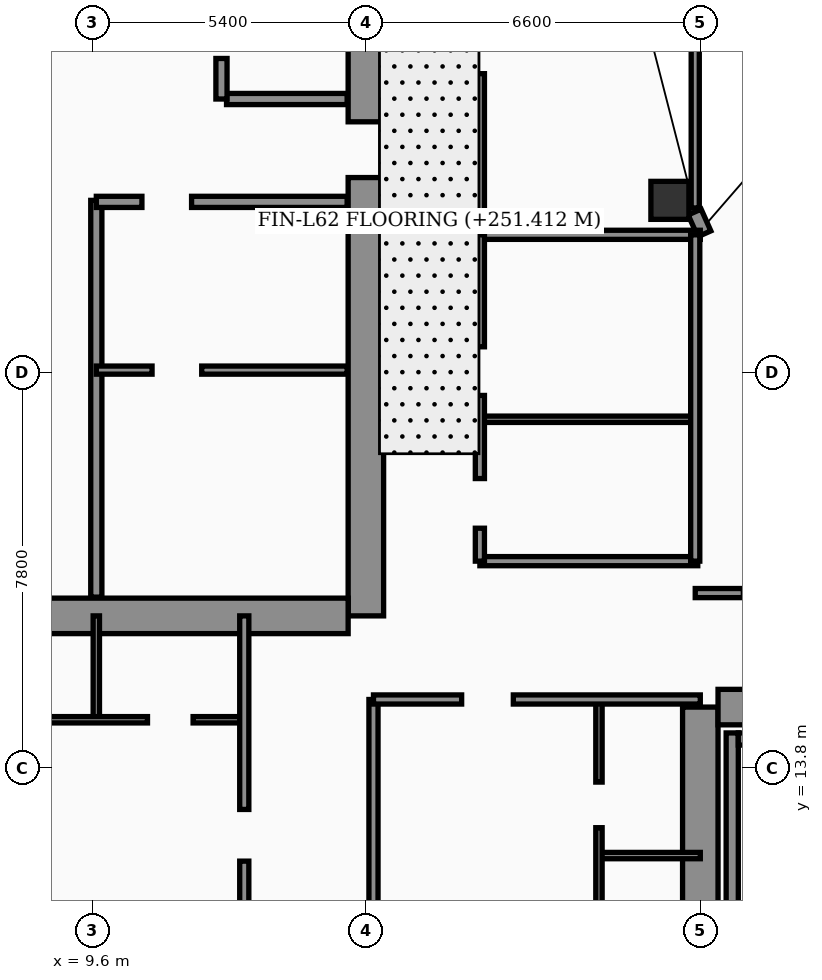
"""IFC4 building model, lengths in metres.
Left out: names, types, materials, properties, quantities, classifications, styles, units other than length and angle.
Written with IfcOpenShell. Run it as: python <this file> out.ifc"""

import sys

from ifc_helpers import new_model, si_unit, direction, frame, frame_2d, origin, origin_2d, place, context, subcontext, project, spatial, rectangle, hollow_rectangle, extrude, element, fill, save


model = new_model("IFC4")
c1 = context("Model", 3, precision=1e-05, world=origin(), true_north=direction((0.0, 1.0)))
c2 = subcontext(c1, "Body", "Model", "MODEL_VIEW")
j1 = project(units=[si_unit("LENGTHUNIT", "METRE"), si_unit("PLANEANGLEUNIT", "RADIAN")], contexts=[c1])
p1 = place(None, origin())
s1 = spatial("IfcSite", under=j1, at=p1, CompositionType="ELEMENT")
p2 = place(p1, origin())
s2 = spatial("IfcBuilding", under=s1, at=p2, CompositionType="ELEMENT")
p3 = place(p2, frame((0.0, 0.0, 251.4)))
s3 = spatial("IfcBuildingStorey", under=s2, at=p3, CompositionType="ELEMENT", Elevation=251.4)
p4 = place(p3, frame((15.0, 16.8, 0.0), z_axis=(0.0, 0.0, 1.0), x_axis=(0.0, 1.0, 0.0)))
e1 = element("IfcWall", 1, at=p4, inside=s3, PredefinedType="SHEAR", context=c2, shape_type="SweptSolid", body=[
    extrude(rectangle(XDim=21.6, YDim=0.7, at=frame_2d((10.8, 0.0))), origin(), (0.0, 0.0, 1.0), 3.56),
])
p5 = place(p4, frame((8.65, 0.0, 0.0)))
e2 = element("IfcOpeningElement", 2, at=p5, cuts=e1, PredefinedType="OPENING", context=c2, shape_type="SweptSolid", body=[
    extrude(rectangle(XDim=1.1, YDim=2.2, at=frame_2d((0.55, 1.1))), frame((0.0, 0.36, 0.0), z_axis=(0.0, -1.0, 0.0), x_axis=(1.0, 0.0, 0.0)), (0.0, 0.0, 1.0), 0.72),
])
p6 = place(p4, frame((18.9, 0.0, 0.0)))
e3 = element("IfcOpeningElement", 3, at=p6, cuts=e1, PredefinedType="OPENING", context=c2, shape_type="SweptSolid", body=[
    extrude(rectangle(XDim=1.1, YDim=2.2, at=frame_2d((0.55, 1.1))), frame((0.0, 0.36, 0.0), z_axis=(0.0, -1.0, 0.0), x_axis=(1.0, 0.0, 0.0)), (0.0, 0.0, 1.0), 0.72),
])
p7 = place(p3, frame((4.55, 16.8, 0.0), z_axis=(0.0, 0.0, 1.0), x_axis=(1.0, 0.0, 0.0)))
e4 = element("IfcWall", 4, at=p7, inside=s3, PredefinedType="SHEAR", context=c2, shape_type="SweptSolid", body=[
    extrude(rectangle(XDim=10.1, YDim=0.7, at=frame_2d((5.05, 0.0))), origin(), (0.0, 0.0, 1.0), 3.56),
])
p8 = place(p3, frame((21.6, 4.6, 0.0), z_axis=(0.0, 0.0, 1.0), x_axis=(0.0, 1.0, 0.0)))
e5 = element("IfcWall", 5, at=p8, inside=s3, PredefinedType="SHEAR", context=c2, shape_type="SweptSolid", body=[
    extrude(rectangle(XDim=10.4, YDim=0.7, at=frame_2d((5.2, 0.0))), origin(), (0.0, 0.0, 1.0), 3.56),
])
p9 = place(p3, frame((21.95, 15.0, 0.0), z_axis=(0.0, 0.0, 1.0), x_axis=(1.0, 0.0, 0.0)))
e6 = element("IfcWall", 6, at=p9, inside=s3, PredefinedType="SHEAR", context=c2, shape_type="SweptSolid", body=[
    extrude(rectangle(XDim=10.1, YDim=0.7, at=frame_2d((5.05, 0.0))), origin(), (0.0, 0.0, 1.0), 3.56),
])
p10 = place(p9, frame((4.95, 0.0, 0.0)))
e7 = element("IfcOpeningElement", 7, at=p10, cuts=e6, PredefinedType="OPENING", context=c2, shape_type="SweptSolid", body=[
    extrude(rectangle(XDim=1.1, YDim=2.2, at=frame_2d((0.55, 1.1))), frame((0.0, 0.36, 0.0), z_axis=(0.0, -1.0, 0.0), x_axis=(1.0, 0.0, 0.0)), (0.0, 0.0, 1.0), 0.72),
])
p11 = place(p3, frame((22.23, 4.95, 0.0), z_axis=(0.0, 0.0, 1.0), x_axis=(0.0, 1.0, 0.0)))
e8 = element("IfcWall", 8, at=p11, inside=s3, PredefinedType="SOLIDWALL", context=c2, shape_type="SweptSolid", body=[
    extrude(rectangle(XDim=9.54, YDim=0.24, at=frame_2d((4.77, 0.0))), origin(), (0.0, 0.0, 1.0), 3.56),
])
p12 = place(p3, frame((22.35, 14.37, 0.0), z_axis=(0.0, 0.0, 1.0), x_axis=(1.0, 0.0, 0.0)))
e9 = element("IfcWall", 9, at=p12, inside=s3, PredefinedType="SOLIDWALL", context=c2, shape_type="SweptSolid", body=[
    extrude(rectangle(XDim=3.1, YDim=0.24, at=frame_2d((1.55, 0.0))), origin(), (0.0, 0.0, 1.0), 3.56),
])
p13 = place(p3, frame((21.0, 25.0, 0.0), z_axis=(0.0, 0.0, 1.0), x_axis=(1.0, 0.0, 0.0)))
e10 = element("IfcColumn", 10, at=p13, inside=s3, PredefinedType="COLUMN", context=c2, shape_type="SweptSolid", body=[
    extrude(hollow_rectangle(XDim=0.75, YDim=0.75, WallThickness=0.032, at=origin_2d()), origin(), (0.0, 0.0, 1.0), 3.56),
])
p14 = place(p3, frame((21.68, 24.34, 0.0), z_axis=(0.0, 0.0, 1.0), x_axis=(-0.40758134973, 0.913168901875, 0.0)))
e11 = element("IfcWall", 11, at=p14, inside=s3, PredefinedType="SOLIDWALL", context=c2, shape_type="SweptSolid", body=[
    extrude(rectangle(XDim=0.471, YDim=0.28, at=frame_2d((0.235, 0.0))), origin(), (0.0, 0.0, 1.0), 3.56),
])
p15 = place(p3, frame((9.68, 17.17, 0.0), z_axis=(0.0, 0.0, 1.0), x_axis=(0.0, 1.0, 0.0)))
e12 = element("IfcWall", 12, at=p15, inside=s3, PredefinedType="SOLIDWALL", context=c2, shape_type="SweptSolid", body=[
    extrude(rectangle(XDim=7.83, YDim=0.22, at=frame_2d((3.915, 0.0))), origin(), (0.0, 0.0, 1.0), 3.56),
])
p16 = place(p3, frame((9.68, 21.65, 0.0), z_axis=(0.0, 0.0, 1.0), x_axis=(1.0, 0.0, 0.0)))
e13 = element("IfcWall", 13, at=p16, inside=s3, PredefinedType="PARTITIONING", context=c2, shape_type="SweptSolid", body=[
    extrude(rectangle(XDim=4.95, YDim=0.16, at=frame_2d((2.475, 0.0))), origin(), (0.0, 0.0, 1.0), 3.09),
])
p17 = place(p16, frame((1.1, 0.0, 0.0)))
e14 = element("IfcOpeningElement", 14, at=p17, cuts=e13, PredefinedType="OPENING", context=c2, shape_type="SweptSolid", body=[
    extrude(rectangle(XDim=0.98, YDim=2.15, at=frame_2d((0.49, 1.075))), frame((0.0, 0.09, 0.0), z_axis=(0.0, -1.0, 0.0), x_axis=(1.0, 0.0, 0.0)), (0.0, 0.0, 1.0), 0.18),
])
p18 = place(p3, frame((9.68, 24.97, 0.0), z_axis=(0.0, 0.0, 1.0), x_axis=(1.0, 0.0, 0.0)))
e15 = element("IfcWall", 15, at=p18, inside=s3, PredefinedType="SOLIDWALL", context=c2, shape_type="SweptSolid", body=[
    extrude(rectangle(XDim=4.95, YDim=0.22, at=frame_2d((2.475, 0.0))), origin(), (0.0, 0.0, 1.0), 2.99),
])
p19 = place(p18, frame((0.9, 0.0, 0.0)))
e16 = element("IfcOpeningElement", 16, at=p19, cuts=e15, PredefinedType="OPENING", context=c2, shape_type="SweptSolid", body=[
    extrude(rectangle(XDim=0.98, YDim=2.15, at=frame_2d((0.49, 1.075))), frame((0.0, 0.12, 0.0), z_axis=(0.0, -1.0, 0.0), x_axis=(1.0, 0.0, 0.0)), (0.0, 0.0, 1.0), 0.24),
])
p20 = place(p3, frame((12.25, 27.0, 0.0), z_axis=(0.0, 0.0, 1.0), x_axis=(1.0, 0.0, 0.0)))
e17 = element("IfcWall", 17, at=p20, inside=s3, PredefinedType="SOLIDWALL", context=c2, shape_type="SweptSolid", body=[
    extrude(rectangle(XDim=2.38, YDim=0.22, at=frame_2d((1.19, 0.0))), origin(), (0.0, 0.0, 1.0), 3.56),
])
p21 = place(p3, frame((12.15, 27.0, 0.0), z_axis=(0.0, 0.0, 1.0), x_axis=(0.0, 1.0, 0.0)))
e18 = element("IfcWall", 18, at=p21, inside=s3, PredefinedType="SOLIDWALL", context=c2, shape_type="SweptSolid", body=[
    extrude(rectangle(XDim=7.75, YDim=0.22, at=frame_2d((3.875, 0.0))), origin(), (0.0, 0.0, 1.0), 3.56),
])
p22 = place(p21, frame((0.8, 0.0, 0.0)))
e19 = element("IfcOpeningElement", 19, at=p22, cuts=e18, PredefinedType="OPENING", context=c2, shape_type="SweptSolid", body=[
    extrude(rectangle(XDim=0.98, YDim=2.15, at=frame_2d((0.49, 1.075))), frame((0.0, 0.12, 0.0), z_axis=(0.0, -1.0, 0.0), x_axis=(1.0, 0.0, 0.0)), (0.0, 0.0, 1.0), 0.24),
])
p23 = place(p3, frame((9.68, 14.75, 0.0), z_axis=(0.0, 0.0, 1.0), x_axis=(0.0, 1.0, 0.0)))
e20 = element("IfcWall", 20, at=p23, inside=s3, PredefinedType="PARTITIONING", context=c2, shape_type="SweptSolid", body=[
    extrude(rectangle(XDim=2.05, YDim=0.125, at=frame_2d((1.025, 0.0))), origin(), (0.0, 0.0, 1.0), 3.56),
])
p24 = place(p3, frame((0.08, 14.75, 0.0), z_axis=(0.0, 0.0, 1.0), x_axis=(1.0, 0.0, 0.0)))
e21 = element("IfcWall", 21, at=p24, inside=s3, PredefinedType="PARTITIONING", context=c2, shape_type="SweptSolid", body=[
    extrude(rectangle(XDim=12.52, YDim=0.125, at=frame_2d((6.26, 0.0))), origin(), (0.0, 0.0, 1.0), 2.99),
])
p25 = place(p24, frame((4.32, 0.0, 0.0)))
e22 = element("IfcOpeningElement", 22, at=p25, cuts=e21, PredefinedType="OPENING", context=c2, shape_type="SweptSolid", body=[
    extrude(rectangle(XDim=0.96, YDim=2.2, at=frame_2d((0.48, 1.1))), frame((0.0, 0.073, 0.0), z_axis=(0.0, -1.0, 0.0), x_axis=(1.0, 0.0, 0.0)), (0.0, 0.0, 1.0), 0.145),
])
p26 = place(p24, frame((10.61, 0.0, 0.0)))
e23 = element("IfcOpeningElement", 23, at=p26, cuts=e21, PredefinedType="OPENING", context=c2, shape_type="SweptSolid", body=[
    extrude(rectangle(XDim=0.9, YDim=2.15, at=frame_2d((0.45, 1.075))), frame((0.0, 0.073, 0.0), z_axis=(0.0, -1.0, 0.0), x_axis=(1.0, 0.0, 0.0)), (0.0, 0.0, 1.0), 0.145),
])
p27 = place(p3, frame((12.6, 2.44, 0.0), z_axis=(0.0, 0.0, 1.0), x_axis=(0.0, 1.0, 0.0)))
e24 = element("IfcWall", 24, at=p27, inside=s3, PredefinedType="PARTITIONING", context=c2, shape_type="SweptSolid", body=[
    extrude(rectangle(XDim=14.36, YDim=0.18, at=frame_2d((7.18, 0.0))), origin(), (0.0, 0.0, 1.0), 2.99),
])
p28 = place(p27, frame((3.01, 0.0, 0.0)))
e25 = element("IfcOpeningElement", 25, at=p28, cuts=e24, PredefinedType="OPENING", context=c2, shape_type="SweptSolid", body=[
    extrude(rectangle(XDim=1.02, YDim=2.2, at=frame_2d((0.51, 1.1))), frame((0.0, 0.1, 0.0), z_axis=(0.0, -1.0, 0.0), x_axis=(1.0, 0.0, 0.0)), (0.0, 0.0, 1.0), 0.2),
])
p29 = place(p27, frame((9.52, 0.0, 0.0)))
e26 = element("IfcOpeningElement", 26, at=p29, cuts=e24, PredefinedType="OPENING", context=c2, shape_type="SweptSolid", body=[
    extrude(rectangle(XDim=1.02, YDim=2.2, at=frame_2d((0.51, 1.1))), frame((0.0, 0.1, 0.0), z_axis=(0.0, -1.0, 0.0), x_axis=(1.0, 0.0, 0.0)), (0.0, 0.0, 1.0), 0.2),
])
p30 = place(p3, frame((15.15, 2.44, 0.0), z_axis=(0.0, 0.0, 1.0), x_axis=(0.0, 1.0, 0.0)))
e27 = element("IfcWall", 27, at=p30, inside=s3, PredefinedType="PARTITIONING", context=c2, shape_type="SweptSolid", body=[
    extrude(rectangle(XDim=12.71, YDim=0.18, at=frame_2d((6.355, 0.0))), origin(), (0.0, 0.0, 1.0), 3.09),
])
p31 = place(p3, frame((19.6, 12.07, 0.0), z_axis=(0.0, 0.0, 1.0), x_axis=(1.0, 0.0, 0.0)))
e28 = element("IfcWall", 28, at=p31, inside=s3, PredefinedType="PARTITIONING", context=c2, shape_type="SweptSolid", body=[
    extrude(rectangle(XDim=2.0, YDim=0.125, at=frame_2d((1.0, 0.0))), origin(), (0.0, 0.0, 1.0), 3.56),
])
p32 = place(p3, frame((19.6, 2.44, 0.0), z_axis=(0.0, 0.0, 1.0), x_axis=(0.0, 1.0, 0.0)))
e29 = element("IfcWall", 29, at=p32, inside=s3, PredefinedType="PARTITIONING", context=c2, shape_type="SweptSolid", body=[
    extrude(rectangle(XDim=12.71, YDim=0.125, at=frame_2d((6.355, 0.0))), origin(), (0.0, 0.0, 1.0), 2.59),
])
p33 = place(p32, frame((4.34, 0.0, 0.0)))
e30 = element("IfcOpeningElement", 30, at=p33, cuts=e29, PredefinedType="OPENING", context=c2, shape_type="SweptSolid", body=[
    extrude(rectangle(XDim=0.96, YDim=2.2, at=frame_2d((0.48, 1.1))), frame((0.0, 0.073, 0.0), z_axis=(0.0, -1.0, 0.0), x_axis=(1.0, 0.0, 0.0)), (0.0, 0.0, 1.0), 0.145),
])
p34 = place(p32, frame((10.18, 0.0, 0.0)))
e31 = element("IfcOpeningElement", 31, at=p34, cuts=e29, PredefinedType="OPENING", context=c2, shape_type="SweptSolid", body=[
    extrude(rectangle(XDim=0.9, YDim=2.15, at=frame_2d((0.45, 1.075))), frame((0.0, 0.073, 0.0), z_axis=(0.0, -1.0, 0.0), x_axis=(1.0, 0.0, 0.0)), (0.0, 0.0, 1.0), 0.145),
])
p35 = place(p3, frame((15.15, 15.15, 0.0), z_axis=(0.0, 0.0, 1.0), x_axis=(1.0, 0.0, 0.0)))
e32 = element("IfcWall", 32, at=p35, inside=s3, PredefinedType="PARTITIONING", context=c2, shape_type="SweptSolid", body=[
    extrude(rectangle(XDim=6.45, YDim=0.18, at=frame_2d((3.225, 0.0))), origin(), (0.0, 0.0, 1.0), 2.59),
])
p36 = place(p35, frame((1.74, 0.0, 0.0)))
e33 = element("IfcOpeningElement", 33, at=p36, cuts=e32, PredefinedType="OPENING", context=c2, shape_type="SweptSolid", body=[
    extrude(rectangle(XDim=1.02, YDim=2.2, at=frame_2d((0.51, 1.1))), frame((0.0, 0.1, 0.0), z_axis=(0.0, -1.0, 0.0), x_axis=(1.0, 0.0, 0.0)), (0.0, 0.0, 1.0), 0.2),
])
p37 = place(p3, frame((17.25, 24.3, 0.0), z_axis=(0.0, 0.0, 1.0), x_axis=(0.0, 1.0, 0.0)))
e34 = element("IfcWall", 34, at=p37, inside=s3, PredefinedType="PARTITIONING", context=c2, shape_type="SweptSolid", body=[
    extrude(rectangle(XDim=18.15, YDim=0.18, at=frame_2d((9.075, 0.0))), origin(), (0.0, 0.0, 1.0), 2.99),
])
p38 = place(p37, frame((3.2, 0.0, 0.0)))
e35 = element("IfcOpeningElement", 35, at=p38, cuts=e34, PredefinedType="OPENING", context=c2, shape_type="SweptSolid", body=[
    extrude(rectangle(XDim=1.02, YDim=2.2, at=frame_2d((0.51, 1.1))), frame((0.0, 0.1, 0.0), z_axis=(0.0, -1.0, 0.0), x_axis=(1.0, 0.0, 0.0)), (0.0, 0.0, 1.0), 0.2),
])
p39 = place(p3, frame((17.25, 17.88, 0.0), z_axis=(0.0, 0.0, 1.0), x_axis=(1.0, 0.0, 0.0)))
e36 = element("IfcWall", 36, at=p39, inside=s3, PredefinedType="PARTITIONING", context=c2, shape_type="SweptSolid", body=[
    extrude(rectangle(XDim=4.3, YDim=0.18, at=frame_2d((2.15, 0.0))), origin(), (0.0, 0.0, 1.0), 3.56),
])
p40 = place(p3, frame((17.25, 20.68, 0.0), z_axis=(0.0, 0.0, 1.0), x_axis=(1.0, 0.0, 0.0)))
e37 = element("IfcWall", 37, at=p40, inside=s3, PredefinedType="PARTITIONING", context=c2, shape_type="SweptSolid", body=[
    extrude(rectangle(XDim=4.3, YDim=0.125, at=frame_2d((2.15, 0.0))), origin(), (0.0, 0.0, 1.0), 3.56),
])
p41 = place(p3, frame((17.25, 24.32, 0.0), z_axis=(0.0, 0.0, 1.0), x_axis=(1.0, 0.0, 0.0)))
e38 = element("IfcWall", 38, at=p41, inside=s3, PredefinedType="PARTITIONING", context=c2, shape_type="SweptSolid", body=[
    extrude(rectangle(XDim=4.35, YDim=0.18, at=frame_2d((2.175, 0.0))), origin(), (0.0, 0.0, 1.0), 3.56),
])
p42 = place(p3, frame((21.5, 17.88, 0.0), z_axis=(0.0, 0.0, 1.0), x_axis=(0.0, 1.0, 0.0)))
e39 = element("IfcWall", 39, at=p42, inside=s3, PredefinedType="PARTITIONING", context=c2, shape_type="SweptSolid", body=[
    extrude(rectangle(XDim=6.44, YDim=0.18, at=frame_2d((3.22, 0.0))), origin(), (0.0, 0.0, 1.0), 3.09),
])
p43 = place(p3, frame((17.25, 17.88, 0.0), z_axis=(0.0, 0.0, 1.0), x_axis=(0.0, 1.0, 0.0)))
e40 = element("IfcWall", 40, at=p43, inside=s3, PredefinedType="PARTITIONING", context=c2, shape_type="SweptSolid", body=[
    extrude(rectangle(XDim=6.44, YDim=0.18, at=frame_2d((3.22, 0.0))), origin(), (0.0, 0.0, 1.0), 3.09),
])
p44 = place(p43, frame((0.65, 0.0, 0.0)))
e41 = element("IfcOpeningElement", 41, at=p44, cuts=e40, PredefinedType="OPENING", context=c2, shape_type="SweptSolid", body=[
    extrude(rectangle(XDim=0.98, YDim=2.15, at=frame_2d((0.49, 1.075))), frame((0.0, 0.1, 0.0), z_axis=(0.0, -1.0, 0.0), x_axis=(1.0, 0.0, 0.0)), (0.0, 0.0, 1.0), 0.2),
])
p45 = place(p43, frame((3.27, 0.0, 0.0)))
e42 = element("IfcOpeningElement", 42, at=p45, cuts=e40, PredefinedType="OPENING", context=c2, shape_type="SweptSolid", body=[
    extrude(rectangle(XDim=0.96, YDim=2.2, at=frame_2d((0.48, 1.1))), frame((0.0, 0.1, 0.0), z_axis=(0.0, -1.0, 0.0), x_axis=(1.0, 0.0, 0.0)), (0.0, 0.0, 1.0), 0.2),
])
p46 = place(p3, frame((21.5, 24.85, 0.0), z_axis=(0.0, 0.0, 1.0), x_axis=(0.0, 1.0, 0.0)))
e43 = element("IfcWall", 43, at=p46, inside=s3, PredefinedType="PARTITIONING", context=c2, shape_type="SweptSolid", body=[
    extrude(rectangle(XDim=13.05, YDim=0.16, at=frame_2d((6.525, 0.0))), origin(), (0.0, 0.0, 1.0), 2.99),
])
p47 = place(p3, frame((21.5, 17.25, 0.0), z_axis=(0.0, 0.0, 1.0), x_axis=(1.0, 0.0, 0.0)))
e44 = element("IfcWall", 44, at=p47, inside=s3, PredefinedType="PARTITIONING", context=c2, shape_type="SweptSolid", body=[
    extrude(rectangle(XDim=6.9, YDim=0.18, at=frame_2d((3.45, 0.0))), origin(), (0.0, 0.0, 1.0), 2.99),
])
p48 = place(p47, frame((0.95, 0.0, 0.0)))
e45 = element("IfcOpeningElement", 45, at=p48, cuts=e44, PredefinedType="OPENING", context=c2, shape_type="SweptSolid", body=[
    extrude(rectangle(XDim=1.02, YDim=2.2, at=frame_2d((0.51, 1.1))), frame((0.0, 0.1, 0.0), z_axis=(0.0, -1.0, 0.0), x_axis=(1.0, 0.0, 0.0)), (0.0, 0.0, 1.0), 0.2),
])
p49 = place(p17, origin())
e46 = element("IfcDoor", 46, at=p49, inside=s3, OperationType="SINGLE_SWING_LEFT", PredefinedType="DOOR", context=c2, shape_type="SweptSolid", body=[
    extrude(rectangle(XDim=0.98, YDim=2.15, at=frame_2d((0.49, 1.075))), frame((0.0, 0.025, 0.0), z_axis=(0.0, -1.0, 0.0), x_axis=(1.0, 0.0, 0.0)), (0.0, 0.0, 1.0), 0.05),
])
fill(e14, e46)
p50 = place(p19, origin())
e47 = element("IfcDoor", 47, at=p50, inside=s3, OperationType="SINGLE_SWING_RIGHT", PredefinedType="DOOR", context=c2, shape_type="SweptSolid", body=[
    extrude(rectangle(XDim=0.98, YDim=2.15, at=frame_2d((0.49, 1.075))), frame((0.0, 0.025, 0.0), z_axis=(0.0, -1.0, 0.0), x_axis=(1.0, 0.0, 0.0)), (0.0, 0.0, 1.0), 0.05),
])
fill(e16, e47)
p51 = place(p22, origin())
e48 = element("IfcDoor", 48, at=p51, inside=s3, OperationType="SINGLE_SWING_RIGHT", PredefinedType="DOOR", context=c2, shape_type="SweptSolid", body=[
    extrude(rectangle(XDim=0.98, YDim=2.15, at=frame_2d((0.49, 1.075))), frame((0.0, 0.025, 0.0), z_axis=(0.0, -1.0, 0.0), x_axis=(1.0, 0.0, 0.0)), (0.0, 0.0, 1.0), 0.05),
])
fill(e19, e48)
p52 = place(p26, origin())
e49 = element("IfcDoor", 49, at=p52, inside=s3, OperationType="SINGLE_SWING_RIGHT", PredefinedType="DOOR", context=c2, shape_type="SweptSolid", body=[
    extrude(rectangle(XDim=0.9, YDim=2.15, at=frame_2d((0.45, 1.075))), frame((0.0, 0.025, 0.0), z_axis=(0.0, -1.0, 0.0), x_axis=(1.0, 0.0, 0.0)), (0.0, 0.0, 1.0), 0.05),
])
fill(e23, e49)
p53 = place(p29, origin())
e50 = element("IfcDoor", 50, at=p53, inside=s3, OperationType="SINGLE_SWING_RIGHT", PredefinedType="DOOR", context=c2, shape_type="SweptSolid", body=[
    extrude(rectangle(XDim=1.02, YDim=2.2, at=frame_2d((0.51, 1.1))), frame((0.0, 0.025, 0.0), z_axis=(0.0, -1.0, 0.0), x_axis=(1.0, 0.0, 0.0)), (0.0, 0.0, 1.0), 0.05),
])
fill(e26, e50)
p54 = place(p34, origin())
e51 = element("IfcDoor", 51, at=p54, inside=s3, OperationType="SINGLE_SWING_RIGHT", PredefinedType="DOOR", context=c2, shape_type="SweptSolid", body=[
    extrude(rectangle(XDim=0.9, YDim=2.15, at=frame_2d((0.45, 1.075))), frame((0.0, 0.025, 0.0), z_axis=(0.0, -1.0, 0.0), x_axis=(1.0, 0.0, 0.0)), (0.0, 0.0, 1.0), 0.05),
])
fill(e31, e51)
p55 = place(p36, origin())
e52 = element("IfcDoor", 52, at=p55, inside=s3, OperationType="SINGLE_SWING_LEFT", PredefinedType="DOOR", context=c2, shape_type="SweptSolid", body=[
    extrude(rectangle(XDim=1.02, YDim=2.2, at=frame_2d((0.51, 1.1))), frame((0.0, 0.025, 0.0), z_axis=(0.0, -1.0, 0.0), x_axis=(1.0, 0.0, 0.0)), (0.0, 0.0, 1.0), 0.05),
])
fill(e33, e52)
p56 = place(p38, origin())
e53 = element("IfcDoor", 53, at=p56, inside=s3, OperationType="SINGLE_SWING_RIGHT", PredefinedType="DOOR", context=c2, shape_type="SweptSolid", body=[
    extrude(rectangle(XDim=1.02, YDim=2.2, at=frame_2d((0.51, 1.1))), frame((0.0, 0.025, 0.0), z_axis=(0.0, -1.0, 0.0), x_axis=(1.0, 0.0, 0.0)), (0.0, 0.0, 1.0), 0.05),
])
fill(e35, e53)
p57 = place(p44, origin())
e54 = element("IfcDoor", 54, at=p57, inside=s3, OperationType="SINGLE_SWING_LEFT", PredefinedType="DOOR", context=c2, shape_type="SweptSolid", body=[
    extrude(rectangle(XDim=0.98, YDim=2.15, at=frame_2d((0.49, 1.075))), frame((0.0, 0.025, 0.0), z_axis=(0.0, -1.0, 0.0), x_axis=(1.0, 0.0, 0.0)), (0.0, 0.0, 1.0), 0.05),
])
fill(e41, e54)
p58 = place(p45, origin())
e55 = element("IfcDoor", 55, at=p58, inside=s3, OperationType="SINGLE_SWING_RIGHT", PredefinedType="DOOR", context=c2, shape_type="SweptSolid", body=[
    extrude(rectangle(XDim=0.96, YDim=2.2, at=frame_2d((0.48, 1.1))), frame((0.0, 0.025, 0.0), z_axis=(0.0, -1.0, 0.0), x_axis=(1.0, 0.0, 0.0)), (0.0, 0.0, 1.0), 0.05),
])
fill(e42, e55)
p59 = place(p5, origin())
e56 = element("IfcDoor", 56, at=p59, inside=s3, OperationType="SINGLE_SWING_LEFT", PredefinedType="DOOR", context=c2, shape_type="SweptSolid", body=[
    extrude(rectangle(XDim=1.1, YDim=2.2, at=frame_2d((0.55, 1.1))), frame((0.0, 0.025, 0.0), z_axis=(0.0, -1.0, 0.0), x_axis=(1.0, 0.0, 0.0)), (0.0, 0.0, 1.0), 0.05),
])
fill(e2, e56)
save(model, sys.argv[1])
